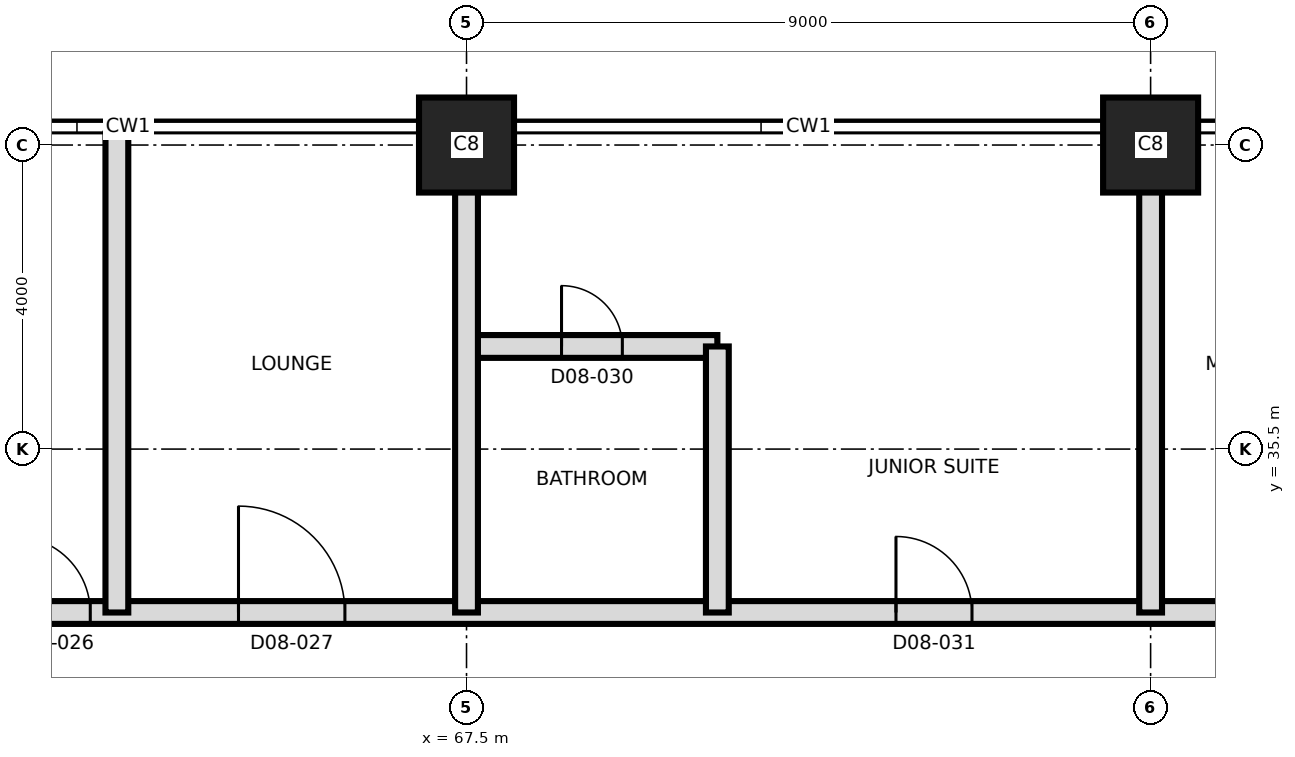
"""IFC4 building model, lengths in metres.
Left out: names, types, materials, properties, quantities, classifications, styles, units other than length and angle.
Written with IfcOpenShell. Run it as: python <this file> out.ifc"""

import sys

from ifc_helpers import new_model, si_unit, direction, frame, frame_2d, origin, origin_2d, place, context, subcontext, project, spatial, rectangle, extrude, element, fill, save


model = new_model("IFC4")
c1 = context("Model", 3, precision=1e-05, world=origin(), true_north=direction((0.0, 1.0)))
c2 = subcontext(c1, "Body", "Model", "MODEL_VIEW")
j1 = project(units=[si_unit("LENGTHUNIT", "METRE"), si_unit("PLANEANGLEUNIT", "RADIAN")], contexts=[c1])
p1 = place(None, origin())
s1 = spatial("IfcSite", under=j1, at=p1, CompositionType="ELEMENT")
p2 = place(p1, origin())
s2 = spatial("IfcBuilding", under=s1, at=p2, CompositionType="ELEMENT")
p3 = place(p2, frame((0.0, 0.0, 101.9)))
s3 = spatial("IfcBuildingStorey", under=s2, at=p3, CompositionType="ELEMENT", Elevation=101.9)
for number, where, z_axis, x_axis in (
    (1, (67.5, 39.5, 0.0), (0.0, 0.0, 1.0), (1.0, 0.0, 0.0)),
    (2, (76.5, 39.5, 0.0), (0.0, 0.0, 1.0), (1.0, 0.0, 0.0)),
):
    element("IfcColumn", number, at=place(p3, frame(where, z_axis=z_axis, x_axis=x_axis)), inside=s3, PredefinedType="COLUMN", context=c2, shape_type="SweptSolid", body=[
        extrude(rectangle(XDim=1.25, YDim=1.25, at=origin_2d()), origin(), (0.0, 0.0, 1.0), 3.7),
    ])
p4 = place(p3, frame((58.8, 33.35, 0.0), z_axis=(0.0, 0.0, 1.0), x_axis=(1.0, 0.0, 0.0)))
e3 = element("IfcWall", 3, at=p4, inside=s3, PredefinedType="PARTITIONING", context=c2, shape_type="SweptSolid", body=[
    extrude(rectangle(XDim=26.53, YDim=0.3, at=frame_2d((13.265, 0.0))), origin(), (0.0, 0.0, 1.0), 3.4),
])
p5 = place(p4, frame((2.75, 0.0, 0.0)))
e4 = element("IfcOpeningElement", 4, at=p5, cuts=e3, PredefinedType="OPENING", context=c2, shape_type="SweptSolid", body=[
    extrude(rectangle(XDim=1.0, YDim=2.1, at=frame_2d((0.5, 1.05))), frame((0.0, 0.16, 0.0), z_axis=(0.0, -1.0, 0.0), x_axis=(1.0, 0.0, 0.0)), (0.0, 0.0, 1.0), 0.32),
])
p6 = place(p4, frame((5.7, 0.0, 0.0)))
e5 = element("IfcOpeningElement", 5, at=p6, cuts=e3, PredefinedType="OPENING", context=c2, shape_type="SweptSolid", body=[
    extrude(rectangle(XDim=1.4, YDim=2.1, at=frame_2d((0.7, 1.05))), frame((0.0, 0.16, 0.0), z_axis=(0.0, -1.0, 0.0), x_axis=(1.0, 0.0, 0.0)), (0.0, 0.0, 1.0), 0.32),
])
p7 = place(p4, frame((14.35, 0.0, 0.0)))
e6 = element("IfcOpeningElement", 6, at=p7, cuts=e3, PredefinedType="OPENING", context=c2, shape_type="SweptSolid", body=[
    extrude(rectangle(XDim=1.0, YDim=2.4, at=frame_2d((0.5, 1.2))), frame((0.0, 0.16, 0.0), z_axis=(0.0, -1.0, 0.0), x_axis=(1.0, 0.0, 0.0)), (0.0, 0.0, 1.0), 0.32),
])
p8 = place(p4, frame((18.835, 0.0, 0.0)))
e7 = element("IfcOpeningElement", 7, at=p8, cuts=e3, PredefinedType="OPENING", context=c2, shape_type="SweptSolid", body=[
    extrude(rectangle(XDim=1.2, YDim=2.1, at=frame_2d((0.6, 1.05))), frame((0.0, 0.16, 0.0), z_axis=(0.0, -1.0, 0.0), x_axis=(1.0, 0.0, 0.0)), (0.0, 0.0, 1.0), 0.32),
])
p9 = place(p4, frame((22.085, 0.0, 0.0)))
e8 = element("IfcOpeningElement", 8, at=p9, cuts=e3, PredefinedType="OPENING", context=c2, shape_type="SweptSolid", body=[
    extrude(rectangle(XDim=1.0, YDim=2.1, at=frame_2d((0.5, 1.05))), frame((0.0, 0.16, 0.0), z_axis=(0.0, -1.0, 0.0), x_axis=(1.0, 0.0, 0.0)), (0.0, 0.0, 1.0), 0.32),
])
p10 = place(p3, frame((67.5, 36.85, 0.0), z_axis=(0.0, 0.0, 1.0), x_axis=(1.0, 0.0, 0.0)))
e9 = element("IfcWall", 9, at=p10, inside=s3, PredefinedType="PARTITIONING", context=c2, shape_type="SweptSolid", body=[
    extrude(rectangle(XDim=3.3, YDim=0.3, at=frame_2d((1.65, 0.0))), origin(), (0.0, 0.0, 1.0), 3.4),
])
p11 = place(p10, frame((1.25, 0.0, 0.0)))
e10 = element("IfcOpeningElement", 10, at=p11, cuts=e9, PredefinedType="OPENING", context=c2, shape_type="SweptSolid", body=[
    extrude(rectangle(XDim=0.8, YDim=2.1, at=frame_2d((0.4, 1.05))), frame((0.0, 0.16, 0.0), z_axis=(0.0, -1.0, 0.0), x_axis=(1.0, 0.0, 0.0)), (0.0, 0.0, 1.0), 0.32),
])
p12 = place(p3, frame((62.9, 33.35, 0.0), z_axis=(0.0, 0.0, 1.0), x_axis=(0.0, 1.0, 0.0)))
e11 = element("IfcWall", 11, at=p12, inside=s3, PredefinedType="PARTITIONING", context=c2, shape_type="SweptSolid", body=[
    extrude(rectangle(XDim=6.3, YDim=0.3, at=frame_2d((3.15, 0.0))), origin(), (0.0, 0.0, 1.0), 3.4),
])
p13 = place(p3, frame((67.5, 33.35, 0.0), z_axis=(0.0, 0.0, 1.0), x_axis=(0.0, 1.0, 0.0)))
e12 = element("IfcWall", 12, at=p13, inside=s3, PredefinedType="PARTITIONING", context=c2, shape_type="SweptSolid", body=[
    extrude(rectangle(XDim=6.12, YDim=0.3, at=frame_2d((3.06, 0.0))), origin(), (0.0, 0.0, 1.0), 3.4),
])
p14 = place(p3, frame((70.8, 33.35, 0.0), z_axis=(0.0, 0.0, 1.0), x_axis=(0.0, 1.0, 0.0)))
e13 = element("IfcWall", 13, at=p14, inside=s3, PredefinedType="PARTITIONING", context=c2, shape_type="SweptSolid", body=[
    extrude(rectangle(XDim=3.5, YDim=0.3, at=frame_2d((1.75, 0.0))), origin(), (0.0, 0.0, 1.0), 3.4),
])
p15 = place(p3, frame((76.5, 33.35, 0.0), z_axis=(0.0, 0.0, 1.0), x_axis=(0.0, 1.0, 0.0)))
e14 = element("IfcWall", 14, at=p15, inside=s3, PredefinedType="PARTITIONING", context=c2, shape_type="SweptSolid", body=[
    extrude(rectangle(XDim=6.12, YDim=0.3, at=frame_2d((3.06, 0.0))), origin(), (0.0, 0.0, 1.0), 3.4),
])
p16 = place(p5, origin())
e15 = element("IfcDoor", 15, at=p16, inside=s3, OperationType="SINGLE_SWING_LEFT", PredefinedType="DOOR", context=c2, shape_type="SweptSolid", body=[
    extrude(rectangle(XDim=1.0, YDim=2.1, at=frame_2d((0.5, 1.05))), frame((0.0, 0.025, 0.0), z_axis=(0.0, -1.0, 0.0), x_axis=(1.0, 0.0, 0.0)), (0.0, 0.0, 1.0), 0.05),
])
fill(e4, e15)
p17 = place(p6, origin())
e16 = element("IfcDoor", 16, at=p17, inside=s3, OperationType="SINGLE_SWING_RIGHT", PredefinedType="DOOR", context=c2, shape_type="SweptSolid", body=[
    extrude(rectangle(XDim=1.4, YDim=2.1, at=frame_2d((0.7, 1.05))), frame((0.0, 0.025, 0.0), z_axis=(0.0, -1.0, 0.0), x_axis=(1.0, 0.0, 0.0)), (0.0, 0.0, 1.0), 0.05),
])
fill(e5, e16)
p18 = place(p11, origin())
e17 = element("IfcDoor", 17, at=p18, inside=s3, OperationType="SINGLE_SWING_LEFT", PredefinedType="DOOR", context=c2, shape_type="SweptSolid", body=[
    extrude(rectangle(XDim=0.8, YDim=2.1, at=frame_2d((0.4, 1.05))), frame((0.0, 0.025, 0.0), z_axis=(0.0, -1.0, 0.0), x_axis=(1.0, 0.0, 0.0)), (0.0, 0.0, 1.0), 0.05),
])
fill(e10, e17)
p19 = place(p7, origin())
e18 = element("IfcDoor", 18, at=p19, inside=s3, OperationType="SINGLE_SWING_RIGHT", PredefinedType="DOOR", context=c2, shape_type="SweptSolid", body=[
    extrude(rectangle(XDim=1.0, YDim=2.4, at=frame_2d((0.5, 1.2))), frame((0.0, 0.025, 0.0), z_axis=(0.0, -1.0, 0.0), x_axis=(1.0, 0.0, 0.0)), (0.0, 0.0, 1.0), 0.05),
])
fill(e6, e18)
save(model, sys.argv[1])
